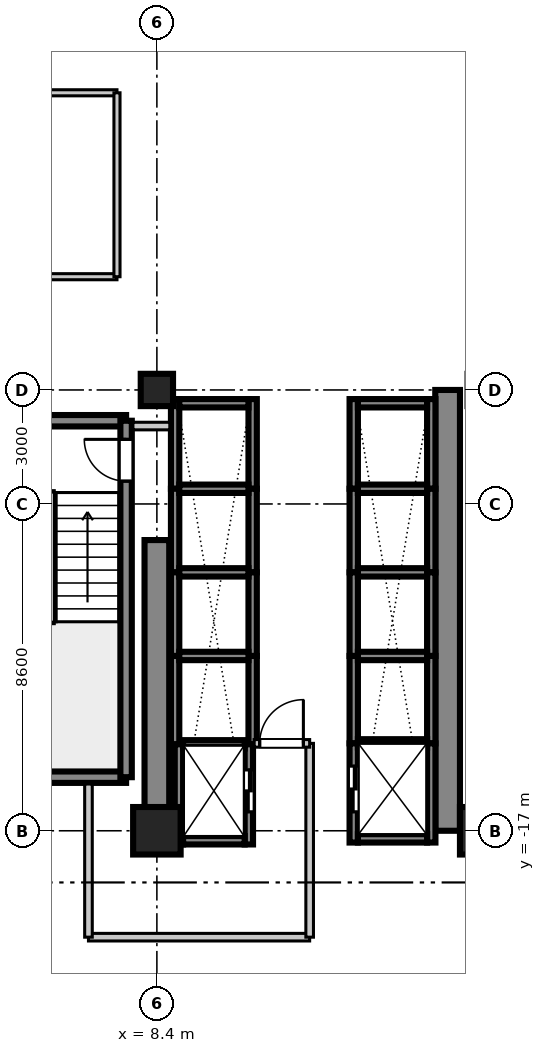
"""IFC4 building model, lengths in metres.
Left out: names, types, materials, properties, quantities, classifications, styles, units other than length and angle.
Written with IfcOpenShell. Run it as: python <this file> out.ifc"""

import sys

from ifc_helpers import new_model, si_unit, direction, frame, frame_2d, origin, origin_2d, place, context, subcontext, project, spatial, rectangle, extrude, source, transform, mapped, element, fill, save


model = new_model("IFC4")
c1 = context("Model", 3, precision=1e-05, world=origin(), true_north=direction((0.0, 1.0)))
c2 = subcontext(c1, "Body", "Model", "MODEL_VIEW")
j1 = project(units=[si_unit("LENGTHUNIT", "METRE"), si_unit("PLANEANGLEUNIT", "RADIAN")], contexts=[c1])
p1 = place(None, origin())
s1 = spatial("IfcSite", under=j1, at=p1, CompositionType="ELEMENT")
p2 = place(p1, origin())
s2 = spatial("IfcBuilding", under=s1, at=p2, CompositionType="ELEMENT")
p3 = place(p2, frame((0.0, 0.0, 95.6)))
s3 = spatial("IfcBuildingStorey", under=s2, at=p3, CompositionType="ELEMENT", Elevation=95.6)
m1 = source(origin(), c2, "Body", "SweptSolid", [
    extrude(rectangle(XDim=1.25, YDim=1.25, at=origin_2d()), origin(), (0.0, 0.0, 1.0), 3.605),
])
p4 = place(p3, frame((8.4, -17.0, 0.0), z_axis=(0.0, 0.0, 1.0), x_axis=(1.0, 0.0, 0.0)))
e1 = element("IfcColumn", 1, at=p4, inside=s3, PredefinedType="COLUMN", context=c2, shape_type="MappedRepresentation", body=[
    mapped(m1, transform((0.0, 0.0, 0.0), scale=1.0)),
])
m2 = source(origin(), c2, "Body", "SweptSolid", [
    extrude(rectangle(XDim=0.85, YDim=0.85, at=origin_2d()), origin(), (0.0, 0.0, 1.0), 3.605),
])
p5 = place(p3, frame((8.4, -5.4, 0.0), z_axis=(0.0, 0.0, 1.0), x_axis=(1.0, 0.0, 0.0)))
e2 = element("IfcColumn", 2, at=p5, inside=s3, PredefinedType="PILASTER", context=c2, shape_type="MappedRepresentation", body=[
    mapped(m2, transform((0.0, 0.0, 0.0), scale=1.0)),
])
p6 = place(p3, frame((17.0, -17.0, 0.0), z_axis=(0.0, 0.0, 1.0), x_axis=(1.0, 0.0, 0.0)))
e3 = element("IfcColumn", 3, at=p6, inside=s3, PredefinedType="COLUMN", context=c2, shape_type="MappedRepresentation", body=[
    mapped(m1, transform((0.0, 0.0, 0.0), scale=1.0)),
])
m3 = source(origin(), c2, "Body", "SweptSolid", [
    extrude(rectangle(XDim=7.65, YDim=0.65, at=frame_2d((3.825, 0.0))), origin(), (0.0, 0.0, 1.0), 3.38),
])
p7 = place(p3, frame((8.4, -17.0, 0.0), z_axis=(0.0, 0.0, 1.0), x_axis=(0.0, 1.0, 0.0)))
e4 = element("IfcWall", 4, at=p7, inside=s3, PredefinedType="SHEAR", context=c2, shape_type="MappedRepresentation", body=[
    mapped(m3, transform((0.0, 0.0, 0.0), scale=1.0)),
])
m4 = source(origin(), c2, "Body", "SweptSolid", [
    extrude(rectangle(XDim=11.6, YDim=0.65, at=frame_2d((5.8, 0.0))), origin(), (0.0, 0.0, 1.0), 3.38),
])
p8 = place(p3, frame((16.05, -17.0, 0.0), z_axis=(0.0, 0.0, 1.0), x_axis=(0.0, 1.0, 0.0)))
e5 = element("IfcWall", 5, at=p8, inside=s3, PredefinedType="SHEAR", context=c2, shape_type="MappedRepresentation", body=[
    mapped(m4, transform((0.0, 0.0, 0.0), scale=1.0)),
])
m5 = source(origin(), c2, "Body", "SweptSolid", [
    extrude(rectangle(XDim=3.98, YDim=0.3, at=frame_2d((1.99, 0.0))), origin(), (0.0, 0.0, 1.0), 3.38),
])
for number, where, z_axis, x_axis in (
    (6, (3.61, -15.59, 0.0), (0.0, 0.0, 1.0), (1.0, 0.0, 0.0)),
    (7, (3.61, -6.21, 0.0), (0.0, 0.0, 1.0), (1.0, 0.0, 0.0)),
):
    element("IfcWall", number, at=place(p3, frame(where, z_axis=z_axis, x_axis=x_axis)), inside=s3, PredefinedType="SHEAR", context=c2, shape_type="MappedRepresentation", body=[
        mapped(m5, transform((0.0, 0.0, 0.0), scale=1.0)),
    ])
m6 = source(origin(), c2, "Body", "SweptSolid", [
    extrude(rectangle(XDim=9.38, YDim=0.3, at=frame_2d((4.69, 0.0))), origin(), (0.0, 0.0, 1.0), 3.38),
])
p9 = place(p3, frame((7.59, -15.59, 0.0), z_axis=(0.0, 0.0, 1.0), x_axis=(0.0, 1.0, 0.0)))
e8 = element("IfcWall", 8, at=p9, inside=s3, PredefinedType="SHEAR", context=c2, shape_type="MappedRepresentation", body=[
    mapped(m6, transform((0.0, 0.0, 0.0), scale=1.0)),
])
p10 = place(p9, frame((7.79, 0.0, 0.0)))
e9 = element("IfcOpeningElement", 9, at=p10, cuts=e8, PredefinedType="OPENING", context=c2, shape_type="SweptSolid", body=[
    extrude(rectangle(XDim=1.1, YDim=2.15, at=frame_2d((0.55, 1.075))), frame((0.0, 0.16, 0.0), z_axis=(0.0, -1.0, 0.0), x_axis=(1.0, 0.0, 0.0)), (0.0, 0.0, 1.0), 0.32),
])
m7 = source(origin(), c2, "Body", "SweptSolid", [
    extrude(rectangle(XDim=2.36, YDim=0.22, at=frame_2d((1.18, 0.0))), origin(), (0.0, 0.0, 1.0), 3.38),
])
for number, where, z_axis, x_axis in (
    (10, (13.58, -8.0, 0.0), (0.0, 0.0, 1.0), (0.0, 1.0, 0.0)),
    (11, (15.62, -8.0, 0.0), (0.0, 0.0, 1.0), (0.0, 1.0, 0.0)),
):
    element("IfcWall", number, at=place(p3, frame(where, z_axis=z_axis, x_axis=x_axis)), inside=s3, PredefinedType="SHEAR", context=c2, shape_type="MappedRepresentation", body=[
        mapped(m7, transform((0.0, 0.0, 0.0), scale=1.0)),
    ])
m8 = source(origin(), c2, "Body", "SweptSolid", [
    extrude(rectangle(XDim=1.82, YDim=0.22, at=frame_2d((0.91, 0.0))), origin(), (0.0, 0.0, 1.0), 3.38),
])
p11 = place(p3, frame((13.69, -5.75, 0.0), z_axis=(0.0, 0.0, 1.0), x_axis=(1.0, 0.0, 0.0)))
e12 = element("IfcWall", 12, at=p11, inside=s3, PredefinedType="SHEAR", context=c2, shape_type="MappedRepresentation", body=[
    mapped(m8, transform((0.0, 0.0, 0.0), scale=1.0)),
])
m9 = source(origin(), c2, "Body", "SweptSolid", [
    extrude(rectangle(XDim=2.2, YDim=0.22, at=frame_2d((1.1, 0.0))), origin(), (0.0, 0.0, 1.0), 3.38),
])
for number, where, z_axis, x_axis in (
    (13, (13.58, -10.2, 0.0), (0.0, 0.0, 1.0), (0.0, 1.0, 0.0)),
    (14, (15.62, -10.2, 0.0), (0.0, 0.0, 1.0), (0.0, 1.0, 0.0)),
):
    element("IfcWall", number, at=place(p3, frame(where, z_axis=z_axis, x_axis=x_axis)), inside=s3, PredefinedType="SHEAR", context=c2, shape_type="MappedRepresentation", body=[
        mapped(m9, transform((0.0, 0.0, 0.0), scale=1.0)),
    ])
m10 = source(origin(), c2, "Body", "SweptSolid", [
    extrude(rectangle(XDim=1.82, YDim=0.22, at=frame_2d((0.91, 0.0))), origin(), (0.0, 0.0, 1.0), 3.65),
])
p12 = place(p3, frame((13.69, -8.0, 0.0), z_axis=(0.0, 0.0, 1.0), x_axis=(1.0, 0.0, 0.0)))
e15 = element("IfcWall", 15, at=p12, inside=s3, PredefinedType="SHEAR", context=c2, shape_type="MappedRepresentation", body=[
    mapped(m10, transform((0.0, 0.0, 0.0), scale=1.0)),
])
for number, where, z_axis, x_axis in (
    (16, (13.58, -12.4, 0.0), (0.0, 0.0, 1.0), (0.0, 1.0, 0.0)),
    (17, (15.62, -12.4, 0.0), (0.0, 0.0, 1.0), (0.0, 1.0, 0.0)),
):
    element("IfcWall", number, at=place(p3, frame(where, z_axis=z_axis, x_axis=x_axis)), inside=s3, PredefinedType="SHEAR", context=c2, shape_type="MappedRepresentation", body=[
        mapped(m9, transform((0.0, 0.0, 0.0), scale=1.0)),
    ])
p13 = place(p3, frame((13.69, -10.2, 0.0), z_axis=(0.0, 0.0, 1.0), x_axis=(1.0, 0.0, 0.0)))
e18 = element("IfcWall", 18, at=p13, inside=s3, PredefinedType="SHEAR", context=c2, shape_type="MappedRepresentation", body=[
    mapped(m10, transform((0.0, 0.0, 0.0), scale=1.0)),
])
m11 = source(origin(), c2, "Body", "SweptSolid", [
    extrude(rectangle(XDim=2.3, YDim=0.22, at=frame_2d((1.15, 0.0))), origin(), (0.0, 0.0, 1.0), 3.38),
])
for number, where, z_axis, x_axis in (
    (19, (13.58, -14.7, 0.0), (0.0, 0.0, 1.0), (0.0, 1.0, 0.0)),
    (20, (15.62, -14.7, 0.0), (0.0, 0.0, 1.0), (0.0, 1.0, 0.0)),
):
    element("IfcWall", number, at=place(p3, frame(where, z_axis=z_axis, x_axis=x_axis)), inside=s3, PredefinedType="SHEAR", context=c2, shape_type="MappedRepresentation", body=[
        mapped(m11, transform((0.0, 0.0, 0.0), scale=1.0)),
    ])
p14 = place(p3, frame((13.69, -12.4, 0.0), z_axis=(0.0, 0.0, 1.0), x_axis=(1.0, 0.0, 0.0)))
e21 = element("IfcWall", 21, at=p14, inside=s3, PredefinedType="SHEAR", context=c2, shape_type="MappedRepresentation", body=[
    mapped(m10, transform((0.0, 0.0, 0.0), scale=1.0)),
])
for number, where, z_axis, x_axis in (
    (22, (8.88, -8.0, 0.0), (0.0, 0.0, 1.0), (0.0, 1.0, 0.0)),
    (23, (10.92, -8.0, 0.0), (0.0, 0.0, 1.0), (0.0, 1.0, 0.0)),
):
    element("IfcWall", number, at=place(p3, frame(where, z_axis=z_axis, x_axis=x_axis)), inside=s3, PredefinedType="SHEAR", context=c2, shape_type="MappedRepresentation", body=[
        mapped(m7, transform((0.0, 0.0, 0.0), scale=1.0)),
    ])
p15 = place(p3, frame((8.99, -5.75, 0.0), z_axis=(0.0, 0.0, 1.0), x_axis=(1.0, 0.0, 0.0)))
e24 = element("IfcWall", 24, at=p15, inside=s3, PredefinedType="SHEAR", context=c2, shape_type="MappedRepresentation", body=[
    mapped(m8, transform((0.0, 0.0, 0.0), scale=1.0)),
])
for number, where, z_axis, x_axis in (
    (25, (8.88, -10.2, 0.0), (0.0, 0.0, 1.0), (0.0, 1.0, 0.0)),
    (26, (10.92, -10.2, 0.0), (0.0, 0.0, 1.0), (0.0, 1.0, 0.0)),
):
    element("IfcWall", number, at=place(p3, frame(where, z_axis=z_axis, x_axis=x_axis)), inside=s3, PredefinedType="SHEAR", context=c2, shape_type="MappedRepresentation", body=[
        mapped(m9, transform((0.0, 0.0, 0.0), scale=1.0)),
    ])
p16 = place(p3, frame((8.99, -8.0, 0.0), z_axis=(0.0, 0.0, 1.0), x_axis=(1.0, 0.0, 0.0)))
e27 = element("IfcWall", 27, at=p16, inside=s3, PredefinedType="SHEAR", context=c2, shape_type="MappedRepresentation", body=[
    mapped(m10, transform((0.0, 0.0, 0.0), scale=1.0)),
])
for number, where, z_axis, x_axis in (
    (28, (8.88, -12.4, 0.0), (0.0, 0.0, 1.0), (0.0, 1.0, 0.0)),
    (29, (10.92, -12.4, 0.0), (0.0, 0.0, 1.0), (0.0, 1.0, 0.0)),
):
    element("IfcWall", number, at=place(p3, frame(where, z_axis=z_axis, x_axis=x_axis)), inside=s3, PredefinedType="SHEAR", context=c2, shape_type="MappedRepresentation", body=[
        mapped(m9, transform((0.0, 0.0, 0.0), scale=1.0)),
    ])
p17 = place(p3, frame((8.99, -10.2, 0.0), z_axis=(0.0, 0.0, 1.0), x_axis=(1.0, 0.0, 0.0)))
e30 = element("IfcWall", 30, at=p17, inside=s3, PredefinedType="SHEAR", context=c2, shape_type="MappedRepresentation", body=[
    mapped(m10, transform((0.0, 0.0, 0.0), scale=1.0)),
])
m12 = source(origin(), c2, "Body", "SweptSolid", [
    extrude(rectangle(XDim=2.325, YDim=0.22, at=frame_2d((1.163, 0.0))), origin(), (0.0, 0.0, 1.0), 3.38),
])
for number, where, z_axis, x_axis in (
    (31, (8.88, -14.725, 0.0), (0.0, 0.0, 1.0), (0.0, 1.0, 0.0)),
    (32, (10.92, -14.725, 0.0), (0.0, 0.0, 1.0), (0.0, 1.0, 0.0)),
):
    element("IfcWall", number, at=place(p3, frame(where, z_axis=z_axis, x_axis=x_axis)), inside=s3, PredefinedType="SHEAR", context=c2, shape_type="MappedRepresentation", body=[
        mapped(m12, transform((0.0, 0.0, 0.0), scale=1.0)),
    ])
p18 = place(p3, frame((8.99, -12.4, 0.0), z_axis=(0.0, 0.0, 1.0), x_axis=(1.0, 0.0, 0.0)))
e33 = element("IfcWall", 33, at=p18, inside=s3, PredefinedType="SHEAR", context=c2, shape_type="MappedRepresentation", body=[
    mapped(m10, transform((0.0, 0.0, 0.0), scale=1.0)),
])
m13 = source(origin(), c2, "Body", "SweptSolid", [
    extrude(rectangle(XDim=2.635, YDim=0.22, at=frame_2d((1.317, 0.0))), origin(), (0.0, 0.0, 1.0), 3.38),
])
p19 = place(p3, frame((8.98, -17.36, 0.0), z_axis=(0.0, 0.0, 1.0), x_axis=(0.0, 1.0, 0.0)))
e34 = element("IfcWall", 34, at=p19, inside=s3, PredefinedType="SHEAR", context=c2, shape_type="MappedRepresentation", body=[
    mapped(m13, transform((0.0, 0.0, 0.0), scale=1.0)),
])
p20 = place(p3, frame((10.82, -17.36, 0.0), z_axis=(0.0, 0.0, 1.0), x_axis=(0.0, 1.0, 0.0)))
e35 = element("IfcWall", 35, at=p20, inside=s3, PredefinedType="SHEAR", context=c2, shape_type="MappedRepresentation", body=[
    mapped(m13, transform((0.0, 0.0, 0.0), scale=1.0)),
])
p21 = place(p20, frame((0.86, 0.0, 0.0)))
e36 = element("IfcOpeningElement", 36, at=p21, cuts=e35, PredefinedType="OPENING", context=c2, shape_type="SweptSolid", body=[
    extrude(rectangle(XDim=1.1, YDim=2.2, at=frame_2d((0.55, 1.1))), frame((0.0, 0.12, 0.0), z_axis=(0.0, -1.0, 0.0), x_axis=(1.0, 0.0, 0.0)), (0.0, 0.0, 1.0), 0.24),
])
m14 = source(origin(), c2, "Body", "SweptSolid", [
    extrude(rectangle(XDim=1.62, YDim=0.22, at=frame_2d((0.81, 0.0))), origin(), (0.0, 0.0, 1.0), 3.38),
])
p22 = place(p3, frame((9.09, -17.25, 0.0), z_axis=(0.0, 0.0, 1.0), x_axis=(1.0, 0.0, 0.0)))
e37 = element("IfcWall", 37, at=p22, inside=s3, PredefinedType="SHEAR", context=c2, shape_type="MappedRepresentation", body=[
    mapped(m14, transform((0.0, 0.0, 0.0), scale=1.0)),
])
m15 = source(origin(), c2, "Body", "SweptSolid", [
    extrude(rectangle(XDim=1.62, YDim=0.22, at=frame_2d((0.81, 0.0))), origin(), (0.0, 0.0, 1.0), 3.65),
])
p23 = place(p3, frame((9.09, -14.725, 0.0), z_axis=(0.0, 0.0, 1.0), x_axis=(1.0, 0.0, 0.0)))
e38 = element("IfcWall", 38, at=p23, inside=s3, PredefinedType="SHEAR", context=c2, shape_type="MappedRepresentation", body=[
    mapped(m15, transform((0.0, 0.0, 0.0), scale=1.0)),
])
m16 = source(origin(), c2, "Body", "SweptSolid", [
    extrude(rectangle(XDim=2.61, YDim=0.22, at=frame_2d((1.305, 0.0))), origin(), (0.0, 0.0, 1.0), 3.38),
])
p24 = place(p3, frame((13.58, -17.31, 0.0), z_axis=(0.0, 0.0, 1.0), x_axis=(0.0, 1.0, 0.0)))
e39 = element("IfcWall", 39, at=p24, inside=s3, PredefinedType="SHEAR", context=c2, shape_type="MappedRepresentation", body=[
    mapped(m16, transform((0.0, 0.0, 0.0), scale=1.0)),
])
p25 = place(p24, frame((0.81, 0.0, 0.0)))
e40 = element("IfcOpeningElement", 40, at=p25, cuts=e39, PredefinedType="OPENING", context=c2, shape_type="SweptSolid", body=[
    extrude(rectangle(XDim=1.2, YDim=2.2, at=frame_2d((0.6, 1.1))), frame((0.0, 0.12, 0.0), z_axis=(0.0, -1.0, 0.0), x_axis=(1.0, 0.0, 0.0)), (0.0, 0.0, 1.0), 0.24),
])
p26 = place(p3, frame((15.62, -17.31, 0.0), z_axis=(0.0, 0.0, 1.0), x_axis=(0.0, 1.0, 0.0)))
e41 = element("IfcWall", 41, at=p26, inside=s3, PredefinedType="SHEAR", context=c2, shape_type="MappedRepresentation", body=[
    mapped(m16, transform((0.0, 0.0, 0.0), scale=1.0)),
])
p27 = place(p3, frame((13.69, -17.2, 0.0), z_axis=(0.0, 0.0, 1.0), x_axis=(1.0, 0.0, 0.0)))
e42 = element("IfcWall", 42, at=p27, inside=s3, PredefinedType="SHEAR", context=c2, shape_type="MappedRepresentation", body=[
    mapped(m8, transform((0.0, 0.0, 0.0), scale=1.0)),
])
p28 = place(p3, frame((13.69, -14.7, 0.0), z_axis=(0.0, 0.0, 1.0), x_axis=(1.0, 0.0, 0.0)))
e43 = element("IfcWall", 43, at=p28, inside=s3, PredefinedType="SHEAR", context=c2, shape_type="MappedRepresentation", body=[
    mapped(m10, transform((0.0, 0.0, 0.0), scale=1.0)),
])
m17 = source(origin(), c2, "Body", "SweptSolid", [
    extrude(rectangle(XDim=5.82, YDim=0.2, at=frame_2d((2.91, 0.0))), origin(), (0.0, 0.0, 1.0), 2.72),
])
p29 = place(p3, frame((6.6, -19.8, 0.0), z_axis=(0.0, 0.0, 1.0), x_axis=(1.0, 0.0, 0.0)))
e44 = element("IfcWall", 44, at=p29, inside=s3, PredefinedType="PARTITIONING", context=c2, shape_type="MappedRepresentation", body=[
    mapped(m17, transform((0.0, 0.0, 0.0), scale=1.0)),
])
m18 = source(origin(), c2, "Body", "SweptSolid", [
    extrude(rectangle(XDim=4.03, YDim=0.2, at=frame_2d((2.015, 0.0))), origin(), (0.0, 0.0, 1.0), 2.72),
])
p30 = place(p3, frame((6.6, -19.8, 0.0), z_axis=(0.0, 0.0, 1.0), x_axis=(0.0, 1.0, 0.0)))
e45 = element("IfcWall", 45, at=p30, inside=s3, PredefinedType="PARTITIONING", context=c2, shape_type="MappedRepresentation", body=[
    mapped(m18, transform((0.0, 0.0, 0.0), scale=1.0)),
])
m19 = source(origin(), c2, "Body", "SweptSolid", [
    extrude(rectangle(XDim=5.1, YDim=0.2, at=frame_2d((2.55, 0.0))), origin(), (0.0, 0.0, 1.0), 2.72),
])
p31 = place(p3, frame((12.42, -19.8, 0.0), z_axis=(0.0, 0.0, 1.0), x_axis=(0.0, 1.0, 0.0)))
e46 = element("IfcWall", 46, at=p31, inside=s3, PredefinedType="PARTITIONING", context=c2, shape_type="MappedRepresentation", body=[
    mapped(m19, transform((0.0, 0.0, 0.0), scale=1.0)),
])
m20 = source(origin(), c2, "Body", "SweptSolid", [
    extrude(rectangle(XDim=1.46, YDim=0.2, at=frame_2d((0.73, 0.0))), origin(), (0.0, 0.0, 1.0), 2.72),
])
p32 = place(p3, frame((10.96, -14.7, 0.0), z_axis=(0.0, 0.0, 1.0), x_axis=(1.0, 0.0, 0.0)))
e47 = element("IfcWall", 47, at=p32, inside=s3, PredefinedType="PARTITIONING", context=c2, shape_type="MappedRepresentation", body=[
    mapped(m20, transform((0.0, 0.0, 0.0), scale=1.0)),
])
p33 = place(p32, frame((0.145, 0.0, 0.0)))
e48 = element("IfcOpeningElement", 48, at=p33, cuts=e47, PredefinedType="OPENING", context=c2, shape_type="SweptSolid", body=[
    extrude(rectangle(XDim=1.15, YDim=2.15, at=frame_2d((0.575, 1.075))), frame((0.0, 0.11, 0.0), z_axis=(0.0, -1.0, 0.0), x_axis=(1.0, 0.0, 0.0)), (0.0, 0.0, 1.0), 0.22),
])
m21 = source(origin(), c2, "Body", "SweptSolid", [
    extrude(rectangle(XDim=0.97, YDim=0.2, at=frame_2d((0.485, 0.0))), origin(), (0.0, 0.0, 1.0), 2.72),
])
p34 = place(p3, frame((7.77, -6.35, 0.0), z_axis=(0.0, 0.0, 1.0), x_axis=(1.0, 0.0, 0.0)))
e49 = element("IfcWall", 49, at=p34, inside=s3, PredefinedType="PARTITIONING", context=c2, shape_type="MappedRepresentation", body=[
    mapped(m21, transform((0.0, 0.0, 0.0), scale=1.0)),
])
m22 = source(origin(), c2, "Body", "SweptSolid", [
    extrude(rectangle(XDim=10.324, YDim=0.16, at=frame_2d((5.162, 0.0))), origin(), (0.0, 0.0, 1.0), 2.72),
])
p35 = place(p3, frame((-2.974, -2.42, 0.0), z_axis=(0.0, 0.0, 1.0), x_axis=(1.0, 0.0, 0.0)))
e50 = element("IfcWall", 50, at=p35, inside=s3, PredefinedType="PARTITIONING", context=c2, shape_type="MappedRepresentation", body=[
    mapped(m22, transform((0.0, 0.0, 0.0), scale=1.0)),
])
p36 = place(p35, frame((2.178, 0.0, 0.0)))
e51 = element("IfcOpeningElement", 51, at=p36, cuts=e50, PredefinedType="OPENING", context=c2, shape_type="SweptSolid", body=[
    extrude(rectangle(XDim=1.5, YDim=2.15, at=frame_2d((0.75, 1.075))), frame((0.0, 0.09, 0.0), z_axis=(0.0, -1.0, 0.0), x_axis=(1.0, 0.0, 0.0)), (0.0, 0.0, 1.0), 0.18),
])
p37 = place(p3, frame((-2.974, 2.42, 0.0), z_axis=(0.0, 0.0, 1.0), x_axis=(1.0, 0.0, 0.0)))
e52 = element("IfcWall", 52, at=p37, inside=s3, PredefinedType="PARTITIONING", context=c2, shape_type="MappedRepresentation", body=[
    mapped(m22, transform((0.0, 0.0, 0.0), scale=1.0)),
])
m23 = source(origin(), c2, "Body", "SweptSolid", [
    extrude(rectangle(XDim=4.84, YDim=0.16, at=frame_2d((2.42, 0.0))), origin(), (0.0, 0.0, 1.0), 2.72),
])
p38 = place(p3, frame((7.35, -2.42, 0.0), z_axis=(0.0, 0.0, 1.0), x_axis=(0.0, 1.0, 0.0)))
e53 = element("IfcWall", 53, at=p38, inside=s3, PredefinedType="PARTITIONING", context=c2, shape_type="MappedRepresentation", body=[
    mapped(m23, transform((0.0, 0.0, 0.0), scale=1.0)),
])
m24 = source(origin(), c2, "Body", "SweptSolid", [
    extrude(rectangle(XDim=1.1, YDim=2.15, at=frame_2d((0.55, 1.075))), frame((0.0, 0.025, 0.0), z_axis=(0.0, -1.0, 0.0), x_axis=(1.0, 0.0, 0.0)), (0.0, 0.0, 1.0), 0.05),
])
p39 = place(p10, origin())
e54 = element("IfcDoor", 54, at=p39, inside=s3, OperationType="SINGLE_SWING_RIGHT", PredefinedType="DOOR", context=c2, shape_type="MappedRepresentation", body=[
    mapped(m24, transform((0.0, 0.0, 0.0), scale=1.0)),
])
fill(e9, e54)
m25 = source(origin(), c2, "Body", "SweptSolid", [
    extrude(rectangle(XDim=1.1, YDim=2.2, at=frame_2d((0.55, 1.1))), frame((0.0, 0.025, 0.0), z_axis=(0.0, -1.0, 0.0), x_axis=(1.0, 0.0, 0.0)), (0.0, 0.0, 1.0), 0.05),
])
p40 = place(p21, frame((1.1, 0.0, 0.0), z_axis=(0.0, 0.0, 1.0), x_axis=(-1.0, 0.0, 0.0)))
e55 = element("IfcDoor", 55, at=p40, inside=s3, OperationType="DOUBLE_DOOR_SLIDING", PredefinedType="DOOR", context=c2, shape_type="MappedRepresentation", body=[
    mapped(m25, transform((0.0, 0.0, 0.0), scale=1.0)),
])
fill(e36, e55)
m26 = source(origin(), c2, "Body", "SweptSolid", [
    extrude(rectangle(XDim=1.2, YDim=2.2, at=frame_2d((0.6, 1.1))), frame((0.0, 0.025, 0.0), z_axis=(0.0, -1.0, 0.0), x_axis=(1.0, 0.0, 0.0)), (0.0, 0.0, 1.0), 0.05),
])
p41 = place(p25, origin())
e56 = element("IfcDoor", 56, at=p41, inside=s3, OperationType="DOUBLE_DOOR_SLIDING", PredefinedType="DOOR", context=c2, shape_type="MappedRepresentation", body=[
    mapped(m26, transform((0.0, 0.0, 0.0), scale=1.0)),
])
fill(e40, e56)
m27 = source(origin(), c2, "Body", "SweptSolid", [
    extrude(rectangle(XDim=1.15, YDim=2.15, at=frame_2d((0.575, 1.075))), frame((0.0, 0.025, 0.0), z_axis=(0.0, -1.0, 0.0), x_axis=(1.0, 0.0, 0.0)), (0.0, 0.0, 1.0), 0.05),
])
p42 = place(p33, origin())
e57 = element("IfcDoor", 57, at=p42, inside=s3, OperationType="SINGLE_SWING_RIGHT", PredefinedType="DOOR", context=c2, shape_type="MappedRepresentation", body=[
    mapped(m27, transform((0.0, 0.0, 0.0), scale=1.0)),
])
fill(e48, e57)
save(model, sys.argv[1])
